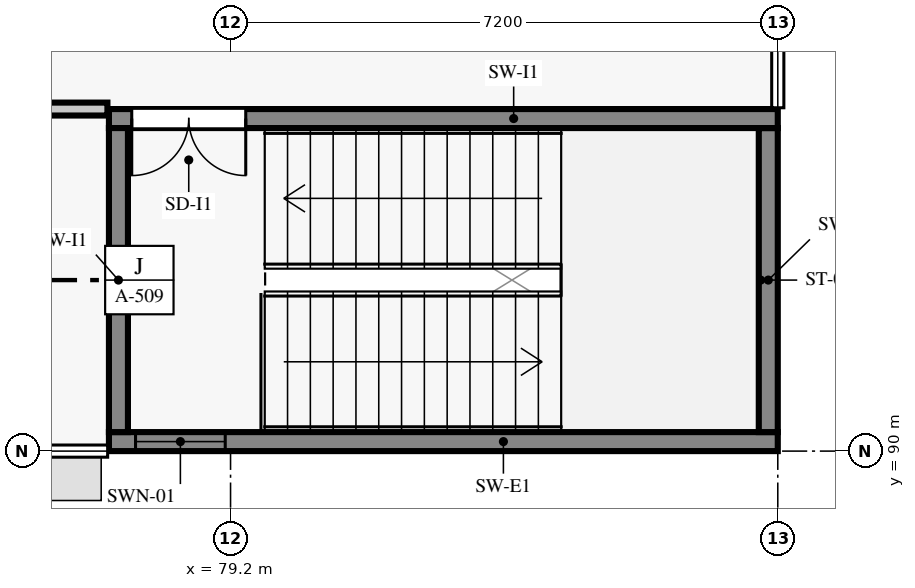
"""IFC4 building model, lengths in metres.
Left out: names, types, materials, properties, quantities, classifications, styles, units other than length and angle.
Written with IfcOpenShell. Run it as: python <this file> out.ifc"""

import sys

from ifc_helpers import new_model, si_unit, direction, frame, frame_2d, origin, place, context, subcontext, project, spatial, rectangle, extrude, element, fill, save


model = new_model("IFC4")
c1 = context("Model", 3, precision=1e-05, world=origin(), true_north=direction((0.0, 1.0)))
c2 = subcontext(c1, "Body", "Model", "MODEL_VIEW")
j1 = project(units=[si_unit("LENGTHUNIT", "METRE"), si_unit("PLANEANGLEUNIT", "RADIAN")], contexts=[c1])
p1 = place(None, origin())
s1 = spatial("IfcSite", under=j1, at=p1, CompositionType="ELEMENT")
p2 = place(p1, origin())
s2 = spatial("IfcBuilding", under=s1, at=p2, CompositionType="ELEMENT")
p3 = place(p2, frame((0.0, 0.0, 22.2)))
s3 = spatial("IfcBuildingStorey", under=s2, at=p3, CompositionType="ELEMENT", Elevation=22.2)
p4 = place(p3, frame((77.6, 90.125, 0.0), z_axis=(0.0, 0.0, 1.0), x_axis=(1.0, 0.0, 0.0)))
e1 = element("IfcWall", 1, at=p4, inside=s3, PredefinedType="SHEAR", context=c2, shape_type="SweptSolid", body=[
    extrude(rectangle(XDim=8.8, YDim=0.25, at=frame_2d((4.4, 0.0))), origin(), (0.0, 0.0, 1.0), 3.975),
])
p5 = place(p4, frame((0.35, 0.0, 0.92)))
e2 = element("IfcOpeningElement", 2, at=p5, cuts=e1, PredefinedType="OPENING", context=c2, shape_type="SweptSolid", body=[
    extrude(rectangle(XDim=1.18, YDim=1.48, at=frame_2d((0.59, 0.74))), frame((0.0, 0.135, 0.0), z_axis=(0.0, -1.0, 0.0), x_axis=(1.0, 0.0, 0.0)), (0.0, 0.0, 1.0), 0.27),
])
p6 = place(p3, frame((86.275, 90.25, 0.0), z_axis=(0.0, 0.0, 1.0), x_axis=(0.0, 1.0, 0.0)))
e3 = element("IfcWall", 3, at=p6, inside=s3, PredefinedType="SHEAR", context=c2, shape_type="SweptSolid", body=[
    extrude(rectangle(XDim=4.0, YDim=0.25, at=frame_2d((2.0, 0.0))), origin(), (0.0, 0.0, 1.0), 3.975),
])
p7 = place(p3, frame((86.4, 94.375, 0.0), z_axis=(0.0, 0.0, 1.0), x_axis=(-1.0, 0.0, 0.0)))
e4 = element("IfcWall", 4, at=p7, inside=s3, PredefinedType="SHEAR", context=c2, shape_type="SweptSolid", body=[
    extrude(rectangle(XDim=8.8, YDim=0.25, at=frame_2d((4.4, 0.0))), origin(), (0.0, 0.0, 1.0), 3.975),
])
p8 = place(p7, frame((7.0, 0.0, 0.0)))
e5 = element("IfcOpeningElement", 5, at=p8, cuts=e4, PredefinedType="OPENING", context=c2, shape_type="SweptSolid", body=[
    extrude(rectangle(XDim=1.5, YDim=2.15, at=frame_2d((0.75, 1.075))), frame((0.0, 0.135, 0.0), z_axis=(0.0, -1.0, 0.0), x_axis=(1.0, 0.0, 0.0)), (0.0, 0.0, 1.0), 0.27),
])
p9 = place(p3, frame((77.725, 94.25, 0.0), z_axis=(0.0, 0.0, 1.0), x_axis=(0.0, -1.0, 0.0)))
e6 = element("IfcWall", 6, at=p9, inside=s3, PredefinedType="SHEAR", context=c2, shape_type="SweptSolid", body=[
    extrude(rectangle(XDim=4.0, YDim=0.25, at=frame_2d((2.0, 0.0))), origin(), (0.0, 0.0, 1.0), 3.975),
])
p10 = place(p3, frame((71.02, 94.5, 0.0), z_axis=(0.0, 0.0, 1.0), x_axis=(1.0, 0.0, 0.0)))
e7 = element("IfcWall", 7, at=p10, inside=s3, PredefinedType="PARTITIONING", context=c2, shape_type="SweptSolid", body=[
    extrude(rectangle(XDim=6.56, YDim=0.17, at=frame_2d((3.28, 0.0))), origin(), (0.0, 0.0, 1.0), 3.425),
])
p11 = place(p10, frame((4.02, 0.0, 0.0)))
e8 = element("IfcOpeningElement", 8, at=p11, cuts=e7, PredefinedType="OPENING", context=c2, shape_type="SweptSolid", body=[
    extrude(rectangle(XDim=1.0, YDim=2.13, at=frame_2d((0.5, 1.065))), frame((0.0, 0.095, 0.0), z_axis=(0.0, -1.0, 0.0), x_axis=(1.0, 0.0, 0.0)), (0.0, 0.0, 1.0), 0.19),
])
p12 = place(p5, origin())
e9 = element("IfcWindow", 9, at=p12, inside=s3, PartitioningType="SINGLE_PANEL", PredefinedType="WINDOW", context=c2, shape_type="SweptSolid", body=[
    extrude(rectangle(XDim=1.18, YDim=1.48, at=frame_2d((0.59, 0.74))), frame((0.0, 0.03, 0.0), z_axis=(0.0, -1.0, 0.0), x_axis=(1.0, 0.0, 0.0)), (0.0, 0.0, 1.0), 0.06),
])
fill(e2, e9)
p13 = place(p8, origin())
e10 = element("IfcDoor", 10, at=p13, inside=s3, OperationType="DOUBLE_DOOR_SINGLE_SWING", PredefinedType="DOOR", context=c2, shape_type="SweptSolid", body=[
    extrude(rectangle(XDim=1.5, YDim=2.15, at=frame_2d((0.75, 1.075))), frame((0.0, 0.025, 0.0), z_axis=(0.0, -1.0, 0.0), x_axis=(1.0, 0.0, 0.0)), (0.0, 0.0, 1.0), 0.05),
])
fill(e5, e10)
save(model, sys.argv[1])
